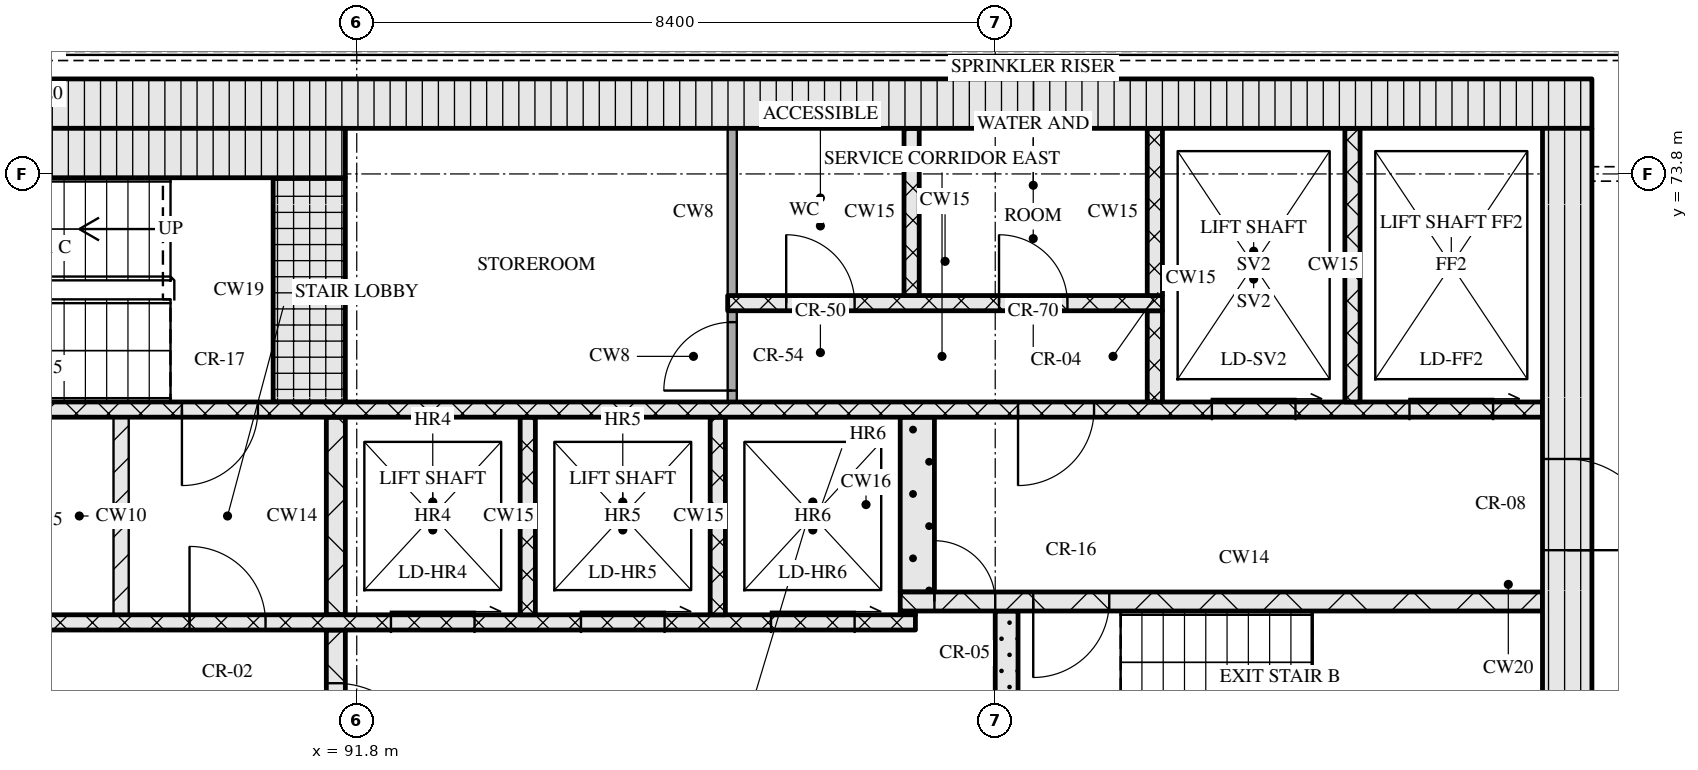
"""IFC4 building model, lengths in metres.
Left out: names, types, materials, properties, quantities, classifications, styles, units other than length and angle.
Written with IfcOpenShell. Run it as: python <this file> out.ifc"""

import sys

from ifc_helpers import new_model, si_unit, direction, frame, frame_2d, origin, place, context, subcontext, project, spatial, rectangle, extrude, element, fill, save


model = new_model("IFC4")
c1 = context("Model", 3, precision=1e-05, world=origin(), true_north=direction((0.0, 1.0)))
c2 = subcontext(c1, "Body", "Model", "MODEL_VIEW")
j1 = project(units=[si_unit("LENGTHUNIT", "METRE"), si_unit("PLANEANGLEUNIT", "RADIAN")], contexts=[c1])
p1 = place(None, origin())
s1 = spatial("IfcSite", under=j1, at=p1, CompositionType="ELEMENT")
p2 = place(p1, origin())
s2 = spatial("IfcBuilding", under=s1, at=p2, CompositionType="ELEMENT")
p3 = place(p2, frame((0.0, 0.0, 248.7)))
s3 = spatial("IfcBuildingStorey", under=s2, at=p3, CompositionType="ELEMENT", Elevation=248.7)
p4 = place(p3, frame((67.15, 74.725, 0.0), z_axis=(0.0, 0.0, 1.0), x_axis=(1.0, 0.0, 0.0)))
e1 = element("IfcWall", 1, at=p4, inside=s3, PredefinedType="SOLIDWALL", context=c2, shape_type="SweptSolid", body=[
    extrude(rectangle(XDim=40.9, YDim=0.65, at=frame_2d((20.45, 0.0))), origin(), (0.0, 0.0, 1.0), 3.3),
])
p5 = place(p3, frame((107.725, 62.4, 0.0), z_axis=(0.0, 0.0, 1.0), x_axis=(0.0, 1.0, 0.0)))
e2 = element("IfcWall", 2, at=p5, inside=s3, PredefinedType="SOLIDWALL", context=c2, shape_type="SweptSolid", body=[
    extrude(rectangle(XDim=12.0, YDim=0.65, at=frame_2d((6.0, 0.0))), origin(), (0.0, 0.0, 1.0), 3.3),
])
p6 = place(p5, frame((6.45, 0.0, 0.0)))
e3 = element("IfcOpeningElement", 3, at=p6, cuts=e2, PredefinedType="OPENING", context=c2, shape_type="SweptSolid", body=[
    extrude(rectangle(XDim=1.2, YDim=2.1, at=frame_2d((0.6, 1.05))), frame((0.0, 0.335, 0.0), z_axis=(0.0, -1.0, 0.0), x_axis=(1.0, 0.0, 0.0)), (0.0, 0.0, 1.0), 0.67),
])
p7 = place(p3, frame((91.525, 65.2, 0.0), z_axis=(0.0, 0.0, 1.0), x_axis=(0.0, 1.0, 0.0)))
e4 = element("IfcWall", 4, at=p7, inside=s3, PredefinedType="SOLIDWALL", context=c2, shape_type="SweptSolid", body=[
    extrude(rectangle(XDim=2.6, YDim=0.25, at=frame_2d((1.3, 0.0))), origin(), (0.0, 0.0, 1.0), 3.3),
])
p8 = place(p7, frame((0.7, 0.0, 0.0)))
e5 = element("IfcOpeningElement", 5, at=p8, cuts=e4, PredefinedType="OPENING", context=c2, shape_type="SweptSolid", body=[
    extrude(rectangle(XDim=1.2, YDim=2.1, at=frame_2d((0.6, 1.05))), frame((0.0, 0.135, 0.0), z_axis=(0.0, -1.0, 0.0), x_axis=(1.0, 0.0, 0.0)), (0.0, 0.0, 1.0), 0.27),
])
p9 = place(p3, frame((100.35, 65.2, 0.0), z_axis=(0.0, 0.0, 1.0), x_axis=(0.0, 1.0, 0.0)))
e6 = element("IfcWall", 6, at=p9, inside=s3, PredefinedType="SOLIDWALL", context=c2, shape_type="SweptSolid", body=[
    extrude(rectangle(XDim=2.85, YDim=0.3, at=frame_2d((1.425, 0.0))), origin(), (0.0, 0.0, 1.0), 3.3),
])
p10 = place(p3, frame((76.05, 67.9, 0.0), z_axis=(0.0, 0.0, 1.0), x_axis=(1.0, 0.0, 0.0)))
e7 = element("IfcWall", 7, at=p10, inside=s3, PredefinedType="SOLIDWALL", context=c2, shape_type="SweptSolid", body=[
    extrude(rectangle(XDim=23.1, YDim=0.2, at=frame_2d((11.55, 0.0))), origin(), (0.0, 0.0, 1.0), 3.3),
])
p11 = place(p10, frame((1.95, 0.0, 0.0)))
e8 = element("IfcOpeningElement", 8, at=p11, cuts=e7, PredefinedType="OPENING", context=c2, shape_type="SweptSolid", body=[
    extrude(rectangle(XDim=0.9, YDim=2.1, at=frame_2d((0.45, 1.05))), frame((0.0, 0.11, 0.0), z_axis=(0.0, -1.0, 0.0), x_axis=(1.0, 0.0, 0.0)), (0.0, 0.0, 1.0), 0.22),
])
p12 = place(p10, frame((5.66, 0.0, 0.0)))
e9 = element("IfcOpeningElement", 9, at=p12, cuts=e7, PredefinedType="OPENING", context=c2, shape_type="SweptSolid", body=[
    extrude(rectangle(XDim=0.9, YDim=2.1, at=frame_2d((0.45, 1.05))), frame((0.0, 0.11, 0.0), z_axis=(0.0, -1.0, 0.0), x_axis=(1.0, 0.0, 0.0)), (0.0, 0.0, 1.0), 0.22),
])
p13 = place(p10, frame((9.7, 0.0, 0.0)))
e10 = element("IfcOpeningElement", 10, at=p13, cuts=e7, PredefinedType="OPENING", context=c2, shape_type="SweptSolid", body=[
    extrude(rectangle(XDim=0.9, YDim=2.1, at=frame_2d((0.45, 1.05))), frame((0.0, 0.11, 0.0), z_axis=(0.0, -1.0, 0.0), x_axis=(1.0, 0.0, 0.0)), (0.0, 0.0, 1.0), 0.22),
])
p14 = place(p10, frame((13.55, 0.0, 0.0)))
e11 = element("IfcOpeningElement", 11, at=p14, cuts=e7, PredefinedType="OPENING", context=c2, shape_type="SweptSolid", body=[
    extrude(rectangle(XDim=1.0, YDim=2.1, at=frame_2d((0.5, 1.05))), frame((0.0, 0.11, 0.0), z_axis=(0.0, -1.0, 0.0), x_axis=(1.0, 0.0, 0.0)), (0.0, 0.0, 1.0), 0.22),
])
p15 = place(p10, frame((16.2, 0.0, 0.0)))
e12 = element("IfcOpeningElement", 12, at=p15, cuts=e7, PredefinedType="OPENING", context=c2, shape_type="SweptSolid", body=[
    extrude(rectangle(XDim=1.1, YDim=2.1, at=frame_2d((0.55, 1.05))), frame((0.0, 0.11, 0.0), z_axis=(0.0, -1.0, 0.0), x_axis=(1.0, 0.0, 0.0)), (0.0, 0.0, 1.0), 0.22),
])
p16 = place(p10, frame((18.7, 0.0, 0.0)))
e13 = element("IfcOpeningElement", 13, at=p16, cuts=e7, PredefinedType="OPENING", context=c2, shape_type="SweptSolid", body=[
    extrude(rectangle(XDim=1.1, YDim=2.1, at=frame_2d((0.55, 1.05))), frame((0.0, 0.11, 0.0), z_axis=(0.0, -1.0, 0.0), x_axis=(1.0, 0.0, 0.0)), (0.0, 0.0, 1.0), 0.22),
])
p17 = place(p10, frame((21.2, 0.0, 0.0)))
e14 = element("IfcOpeningElement", 14, at=p17, cuts=e7, PredefinedType="OPENING", context=c2, shape_type="SweptSolid", body=[
    extrude(rectangle(XDim=1.1, YDim=2.1, at=frame_2d((0.55, 1.05))), frame((0.0, 0.11, 0.0), z_axis=(0.0, -1.0, 0.0), x_axis=(1.0, 0.0, 0.0)), (0.0, 0.0, 1.0), 0.22),
])
p18 = place(p3, frame((88.7, 68.0, 0.0), z_axis=(0.0, 0.0, 1.0), x_axis=(0.0, 1.0, 0.0)))
e15 = element("IfcWall", 15, at=p18, inside=s3, PredefinedType="PARTITIONING", context=c2, shape_type="SweptSolid", body=[
    extrude(rectangle(XDim=2.6, YDim=0.2, at=frame_2d((1.3, 0.0))), origin(), (0.0, 0.0, 1.0), 3.3),
])
p19 = place(p3, frame((91.525, 68.0, 0.0), z_axis=(0.0, 0.0, 1.0), x_axis=(0.0, 1.0, 0.0)))
e16 = element("IfcWall", 16, at=p19, inside=s3, PredefinedType="SOLIDWALL", context=c2, shape_type="SweptSolid", body=[
    extrude(rectangle(XDim=2.6, YDim=0.25, at=frame_2d((1.3, 0.0))), origin(), (0.0, 0.0, 1.0), 3.3),
])
for number, where, z_axis, x_axis in (
    (17, (94.05, 68.0, 0.0), (0.0, 0.0, 1.0), (0.0, 1.0, 0.0)),
    (18, (96.55, 68.0, 0.0), (0.0, 0.0, 1.0), (0.0, 1.0, 0.0)),
):
    element("IfcWall", number, at=place(p3, frame(where, z_axis=z_axis, x_axis=x_axis)), inside=s3, PredefinedType="SOLIDWALL", context=c2, shape_type="SweptSolid", body=[
        extrude(rectangle(XDim=2.6, YDim=0.2, at=frame_2d((1.3, 0.0))), origin(), (0.0, 0.0, 1.0), 3.3),
    ])
p20 = place(p3, frame((98.95, 68.025, 0.0), z_axis=(0.0, 0.0, 1.0), x_axis=(1.0, 0.0, 0.0)))
e19 = element("IfcWall", 19, at=p20, inside=s3, PredefinedType="SOLIDWALL", context=c2, shape_type="SweptSolid", body=[
    extrude(rectangle(XDim=0.2, YDim=0.05, at=frame_2d((0.1, 0.0))), origin(), (0.0, 0.0, 1.0), 3.3),
])
p21 = place(p3, frame((98.95, 68.175, 0.0), z_axis=(0.0, 0.0, 1.0), x_axis=(1.0, 0.0, 0.0)))
e20 = element("IfcWall", 20, at=p21, inside=s3, PredefinedType="SOLIDWALL", context=c2, shape_type="SweptSolid", body=[
    extrude(rectangle(XDim=8.45, YDim=0.25, at=frame_2d((4.225, 0.0))), origin(), (0.0, 0.0, 1.0), 3.3),
])
p22 = place(p21, frame((0.45, 0.0, 0.0)))
e21 = element("IfcOpeningElement", 21, at=p22, cuts=e20, PredefinedType="OPENING", context=c2, shape_type="SweptSolid", body=[
    extrude(rectangle(XDim=0.8, YDim=2.1, at=frame_2d((0.4, 1.05))), frame((0.0, 0.135, 0.0), z_axis=(0.0, -1.0, 0.0), x_axis=(1.0, 0.0, 0.0)), (0.0, 0.0, 1.0), 0.27),
])
p23 = place(p21, frame((1.75, 0.0, 0.0)))
e22 = element("IfcOpeningElement", 22, at=p23, cuts=e20, PredefinedType="OPENING", context=c2, shape_type="SweptSolid", body=[
    extrude(rectangle(XDim=1.0, YDim=2.1, at=frame_2d((0.5, 1.05))), frame((0.0, 0.135, 0.0), z_axis=(0.0, -1.0, 0.0), x_axis=(1.0, 0.0, 0.0)), (0.0, 0.0, 1.0), 0.27),
])
p24 = place(p3, frame((99.175, 68.3, 0.0), z_axis=(0.0, 0.0, 1.0), x_axis=(0.0, 1.0, 0.0)))
e23 = element("IfcWall", 23, at=p24, inside=s3, PredefinedType="SOLIDWALL", context=c2, shape_type="SweptSolid", body=[
    extrude(rectangle(XDim=2.3, YDim=0.45, at=frame_2d((1.15, 0.0))), origin(), (0.0, 0.0, 1.0), 3.3),
])
p25 = place(p3, frame((67.8, 70.7, 0.0), z_axis=(0.0, 0.0, 1.0), x_axis=(1.0, 0.0, 0.0)))
e24 = element("IfcWall", 24, at=p25, inside=s3, PredefinedType="SOLIDWALL", context=c2, shape_type="SweptSolid", body=[
    extrude(rectangle(XDim=39.6, YDim=0.2, at=frame_2d((19.8, 0.0))), origin(), (0.0, 0.0, 1.0), 3.3),
])
p26 = place(p25, frame((0.65, 0.0, 0.0)))
e25 = element("IfcOpeningElement", 25, at=p26, cuts=e24, PredefinedType="OPENING", context=c2, shape_type="SweptSolid", body=[
    extrude(rectangle(XDim=1.1, YDim=2.1, at=frame_2d((0.55, 1.05))), frame((0.0, 0.11, 0.0), z_axis=(0.0, -1.0, 0.0), x_axis=(1.0, 0.0, 0.0)), (0.0, 0.0, 1.0), 0.22),
])
p27 = place(p25, frame((3.25, 0.0, 0.0)))
e26 = element("IfcOpeningElement", 26, at=p27, cuts=e24, PredefinedType="OPENING", context=c2, shape_type="SweptSolid", body=[
    extrude(rectangle(XDim=1.1, YDim=2.1, at=frame_2d((0.55, 1.05))), frame((0.0, 0.11, 0.0), z_axis=(0.0, -1.0, 0.0), x_axis=(1.0, 0.0, 0.0)), (0.0, 0.0, 1.0), 0.22),
])
p28 = place(p25, frame((5.9, 0.0, 0.0)))
e27 = element("IfcOpeningElement", 27, at=p28, cuts=e24, PredefinedType="OPENING", context=c2, shape_type="SweptSolid", body=[
    extrude(rectangle(XDim=1.0, YDim=2.1, at=frame_2d((0.5, 1.05))), frame((0.0, 0.11, 0.0), z_axis=(0.0, -1.0, 0.0), x_axis=(1.0, 0.0, 0.0)), (0.0, 0.0, 1.0), 0.22),
])
p29 = place(p25, frame((21.7, 0.0, 0.0)))
e28 = element("IfcOpeningElement", 28, at=p29, cuts=e24, PredefinedType="OPENING", context=c2, shape_type="SweptSolid", body=[
    extrude(rectangle(XDim=1.0, YDim=2.1, at=frame_2d((0.5, 1.05))), frame((0.0, 0.11, 0.0), z_axis=(0.0, -1.0, 0.0), x_axis=(1.0, 0.0, 0.0)), (0.0, 0.0, 1.0), 0.22),
])
p30 = place(p25, frame((32.7, 0.0, 0.0)))
e29 = element("IfcOpeningElement", 29, at=p30, cuts=e24, PredefinedType="OPENING", context=c2, shape_type="SweptSolid", body=[
    extrude(rectangle(XDim=1.0, YDim=2.1, at=frame_2d((0.5, 1.05))), frame((0.0, 0.11, 0.0), z_axis=(0.0, -1.0, 0.0), x_axis=(1.0, 0.0, 0.0)), (0.0, 0.0, 1.0), 0.22),
])
p31 = place(p25, frame((35.25, 0.0, 0.0)))
e30 = element("IfcOpeningElement", 30, at=p31, cuts=e24, PredefinedType="OPENING", context=c2, shape_type="SweptSolid", body=[
    extrude(rectangle(XDim=1.1, YDim=2.1, at=frame_2d((0.55, 1.05))), frame((0.0, 0.11, 0.0), z_axis=(0.0, -1.0, 0.0), x_axis=(1.0, 0.0, 0.0)), (0.0, 0.0, 1.0), 0.22),
])
p32 = place(p25, frame((37.85, 0.0, 0.0)))
e31 = element("IfcOpeningElement", 31, at=p32, cuts=e24, PredefinedType="OPENING", context=c2, shape_type="SweptSolid", body=[
    extrude(rectangle(XDim=1.1, YDim=2.1, at=frame_2d((0.55, 1.05))), frame((0.0, 0.11, 0.0), z_axis=(0.0, -1.0, 0.0), x_axis=(1.0, 0.0, 0.0)), (0.0, 0.0, 1.0), 0.22),
])
p33 = place(p3, frame((91.175, 70.8, 0.0), z_axis=(0.0, 0.0, 1.0), x_axis=(0.0, 1.0, 0.0)))
e32 = element("IfcWall", 32, at=p33, inside=s3, PredefinedType="SOLIDWALL", context=c2, shape_type="SweptSolid", body=[
    extrude(rectangle(XDim=2.95, YDim=0.95, at=frame_2d((1.475, 0.0))), origin(), (0.0, 0.0, 1.0), 3.3),
])
p34 = place(p3, frame((96.74, 70.8, 0.0), z_axis=(0.0, 0.0, 1.0), x_axis=(0.0, 1.0, 0.0)))
e33 = element("IfcWall", 33, at=p34, inside=s3, PredefinedType="PARTITIONING", context=c2, shape_type="SweptSolid", body=[
    extrude(rectangle(XDim=1.2, YDim=0.12, at=frame_2d((0.6, 0.0))), origin(), (0.0, 0.0, 1.0), 3.3),
])
p35 = place(p34, frame((0.15, 0.0, 0.0)))
e34 = element("IfcOpeningElement", 34, at=p35, cuts=e33, PredefinedType="OPENING", context=c2, shape_type="SweptSolid", body=[
    extrude(rectangle(XDim=0.9, YDim=2.1, at=frame_2d((0.45, 1.05))), frame((0.0, 0.07, 0.0), z_axis=(0.0, -1.0, 0.0), x_axis=(1.0, 0.0, 0.0)), (0.0, 0.0, 1.0), 0.14),
])
p36 = place(p3, frame((102.3, 70.8, 0.0), z_axis=(0.0, 0.0, 1.0), x_axis=(0.0, 1.0, 0.0)))
e35 = element("IfcWall", 35, at=p36, inside=s3, PredefinedType="SOLIDWALL", context=c2, shape_type="SweptSolid", body=[
    extrude(rectangle(XDim=1.2, YDim=0.2, at=frame_2d((0.6, 0.0))), origin(), (0.0, 0.0, 1.0), 3.3),
])
p37 = place(p3, frame((104.9, 70.8, 0.0), z_axis=(0.0, 0.0, 1.0), x_axis=(0.0, 1.0, 0.0)))
e36 = element("IfcWall", 36, at=p37, inside=s3, PredefinedType="SOLIDWALL", context=c2, shape_type="SweptSolid", body=[
    extrude(rectangle(XDim=3.6, YDim=0.2, at=frame_2d((1.8, 0.0))), origin(), (0.0, 0.0, 1.0), 3.3),
])
p38 = place(p3, frame((96.68, 72.1, 0.0), z_axis=(0.0, 0.0, 1.0), x_axis=(1.0, 0.0, 0.0)))
e37 = element("IfcWall", 37, at=p38, inside=s3, PredefinedType="SOLIDWALL", context=c2, shape_type="SweptSolid", body=[
    extrude(rectangle(XDim=5.72, YDim=0.2, at=frame_2d((2.86, 0.0))), origin(), (0.0, 0.0, 1.0), 3.3),
])
p39 = place(p38, frame((0.77, 0.0, 0.0)))
e38 = element("IfcOpeningElement", 38, at=p39, cuts=e37, PredefinedType="OPENING", context=c2, shape_type="SweptSolid", body=[
    extrude(rectangle(XDim=0.9, YDim=2.1, at=frame_2d((0.45, 1.05))), frame((0.0, 0.11, 0.0), z_axis=(0.0, -1.0, 0.0), x_axis=(1.0, 0.0, 0.0)), (0.0, 0.0, 1.0), 0.22),
])
p40 = place(p38, frame((3.57, 0.0, 0.0)))
e39 = element("IfcOpeningElement", 39, at=p40, cuts=e37, PredefinedType="OPENING", context=c2, shape_type="SweptSolid", body=[
    extrude(rectangle(XDim=0.9, YDim=2.1, at=frame_2d((0.45, 1.05))), frame((0.0, 0.11, 0.0), z_axis=(0.0, -1.0, 0.0), x_axis=(1.0, 0.0, 0.0)), (0.0, 0.0, 1.0), 0.22),
])
p41 = place(p3, frame((96.74, 72.2, 0.0), z_axis=(0.0, 0.0, 1.0), x_axis=(0.0, 1.0, 0.0)))
e40 = element("IfcWall", 40, at=p41, inside=s3, PredefinedType="PARTITIONING", context=c2, shape_type="SweptSolid", body=[
    extrude(rectangle(XDim=2.2, YDim=0.12, at=frame_2d((1.1, 0.0))), origin(), (0.0, 0.0, 1.0), 3.3),
])
for number, where, z_axis, x_axis in (
    (41, (99.1, 72.2, 0.0), (0.0, 0.0, 1.0), (0.0, 1.0, 0.0)),
    (42, (102.3, 72.2, 0.0), (0.0, 0.0, 1.0), (0.0, 1.0, 0.0)),
):
    element("IfcWall", number, at=place(p3, frame(where, z_axis=z_axis, x_axis=x_axis)), inside=s3, PredefinedType="SOLIDWALL", context=c2, shape_type="SweptSolid", body=[
        extrude(rectangle(XDim=2.2, YDim=0.2, at=frame_2d((1.1, 0.0))), origin(), (0.0, 0.0, 1.0), 3.3),
    ])
p42 = place(p3, frame((83.55, 74.075, 0.0), z_axis=(0.0, 0.0, 1.0), x_axis=(1.0, 0.0, 0.0)))
e43 = element("IfcWall", 43, at=p42, inside=s3, PredefinedType="SOLIDWALL", context=c2, shape_type="SweptSolid", body=[
    extrude(rectangle(XDim=8.1, YDim=0.65, at=frame_2d((4.05, 0.0))), origin(), (0.0, 0.0, 1.0), 3.3),
])
p43 = place(p8, origin())
e44 = element("IfcDoor", 44, at=p43, inside=s3, OperationType="SINGLE_SWING_RIGHT", PredefinedType="DOOR", context=c2, shape_type="SweptSolid", body=[
    extrude(rectangle(XDim=1.2, YDim=2.1, at=frame_2d((0.6, 1.05))), frame((0.0, 0.025, 0.0), z_axis=(0.0, -1.0, 0.0), x_axis=(1.0, 0.0, 0.0)), (0.0, 0.0, 1.0), 0.05),
])
fill(e5, e44)
p44 = place(p14, origin())
e45 = element("IfcDoor", 45, at=p44, inside=s3, OperationType="SINGLE_SWING_LEFT", PredefinedType="DOOR", context=c2, shape_type="SweptSolid", body=[
    extrude(rectangle(XDim=1.0, YDim=2.1, at=frame_2d((0.5, 1.05))), frame((0.0, 0.025, 0.0), z_axis=(0.0, -1.0, 0.0), x_axis=(1.0, 0.0, 0.0)), (0.0, 0.0, 1.0), 0.05),
])
fill(e11, e45)
p45 = place(p15, origin())
e46 = element("IfcDoor", 46, at=p45, inside=s3, OperationType="SLIDING_TO_RIGHT", PredefinedType="DOOR", context=c2, shape_type="SweptSolid", body=[
    extrude(rectangle(XDim=1.1, YDim=2.1, at=frame_2d((0.55, 1.05))), frame((0.0, 0.025, 0.0), z_axis=(0.0, -1.0, 0.0), x_axis=(1.0, 0.0, 0.0)), (0.0, 0.0, 1.0), 0.05),
])
fill(e12, e46)
p46 = place(p16, origin())
e47 = element("IfcDoor", 47, at=p46, inside=s3, OperationType="SLIDING_TO_RIGHT", PredefinedType="DOOR", context=c2, shape_type="SweptSolid", body=[
    extrude(rectangle(XDim=1.1, YDim=2.1, at=frame_2d((0.55, 1.05))), frame((0.0, 0.025, 0.0), z_axis=(0.0, -1.0, 0.0), x_axis=(1.0, 0.0, 0.0)), (0.0, 0.0, 1.0), 0.05),
])
fill(e13, e47)
p47 = place(p17, origin())
e48 = element("IfcDoor", 48, at=p47, inside=s3, OperationType="SLIDING_TO_RIGHT", PredefinedType="DOOR", context=c2, shape_type="SweptSolid", body=[
    extrude(rectangle(XDim=1.1, YDim=2.1, at=frame_2d((0.55, 1.05))), frame((0.0, 0.025, 0.0), z_axis=(0.0, -1.0, 0.0), x_axis=(1.0, 0.0, 0.0)), (0.0, 0.0, 1.0), 0.05),
])
fill(e14, e48)
p48 = place(p22, origin())
e49 = element("IfcDoor", 49, at=p48, inside=s3, OperationType="SINGLE_SWING_LEFT", PredefinedType="DOOR", context=c2, shape_type="SweptSolid", body=[
    extrude(rectangle(XDim=0.8, YDim=2.1, at=frame_2d((0.4, 1.05))), frame((0.0, 0.025, 0.0), z_axis=(0.0, -1.0, 0.0), x_axis=(1.0, 0.0, 0.0)), (0.0, 0.0, 1.0), 0.05),
])
fill(e21, e49)
p49 = place(p23, origin())
e50 = element("IfcDoor", 50, at=p49, inside=s3, OperationType="SINGLE_SWING_RIGHT", PredefinedType="DOOR", context=c2, shape_type="SweptSolid", body=[
    extrude(rectangle(XDim=1.0, YDim=2.1, at=frame_2d((0.5, 1.05))), frame((0.0, 0.025, 0.0), z_axis=(0.0, -1.0, 0.0), x_axis=(1.0, 0.0, 0.0)), (0.0, 0.0, 1.0), 0.05),
])
fill(e22, e50)
p50 = place(p6, origin())
e51 = element("IfcDoor", 51, at=p50, inside=s3, OperationType="SINGLE_SWING_RIGHT", PredefinedType="DOOR", context=c2, shape_type="SweptSolid", body=[
    extrude(rectangle(XDim=1.2, YDim=2.1, at=frame_2d((0.6, 1.05))), frame((0.0, 0.025, 0.0), z_axis=(0.0, -1.0, 0.0), x_axis=(1.0, 0.0, 0.0)), (0.0, 0.0, 1.0), 0.05),
])
fill(e3, e51)
p51 = place(p29, origin())
e52 = element("IfcDoor", 52, at=p51, inside=s3, OperationType="SINGLE_SWING_RIGHT", PredefinedType="DOOR", context=c2, shape_type="SweptSolid", body=[
    extrude(rectangle(XDim=1.0, YDim=2.1, at=frame_2d((0.5, 1.05))), frame((0.0, 0.025, 0.0), z_axis=(0.0, -1.0, 0.0), x_axis=(1.0, 0.0, 0.0)), (0.0, 0.0, 1.0), 0.05),
])
fill(e28, e52)
p52 = place(p30, origin())
e53 = element("IfcDoor", 53, at=p52, inside=s3, OperationType="SINGLE_SWING_RIGHT", PredefinedType="DOOR", context=c2, shape_type="SweptSolid", body=[
    extrude(rectangle(XDim=1.0, YDim=2.1, at=frame_2d((0.5, 1.05))), frame((0.0, 0.025, 0.0), z_axis=(0.0, -1.0, 0.0), x_axis=(1.0, 0.0, 0.0)), (0.0, 0.0, 1.0), 0.05),
])
fill(e29, e53)
p53 = place(p31, origin())
e54 = element("IfcDoor", 54, at=p53, inside=s3, OperationType="SLIDING_TO_RIGHT", PredefinedType="DOOR", context=c2, shape_type="SweptSolid", body=[
    extrude(rectangle(XDim=1.1, YDim=2.1, at=frame_2d((0.55, 1.05))), frame((0.0, 0.025, 0.0), z_axis=(0.0, -1.0, 0.0), x_axis=(1.0, 0.0, 0.0)), (0.0, 0.0, 1.0), 0.05),
])
fill(e30, e54)
p54 = place(p32, origin())
e55 = element("IfcDoor", 55, at=p54, inside=s3, OperationType="SLIDING_TO_RIGHT", PredefinedType="DOOR", context=c2, shape_type="SweptSolid", body=[
    extrude(rectangle(XDim=1.1, YDim=2.1, at=frame_2d((0.55, 1.05))), frame((0.0, 0.025, 0.0), z_axis=(0.0, -1.0, 0.0), x_axis=(1.0, 0.0, 0.0)), (0.0, 0.0, 1.0), 0.05),
])
fill(e31, e55)
p55 = place(p35, origin())
e56 = element("IfcDoor", 56, at=p55, inside=s3, OperationType="SINGLE_SWING_LEFT", PredefinedType="DOOR", context=c2, shape_type="SweptSolid", body=[
    extrude(rectangle(XDim=0.9, YDim=2.1, at=frame_2d((0.45, 1.05))), frame((0.0, 0.025, 0.0), z_axis=(0.0, -1.0, 0.0), x_axis=(1.0, 0.0, 0.0)), (0.0, 0.0, 1.0), 0.05),
])
fill(e34, e56)
p56 = place(p39, origin())
e57 = element("IfcDoor", 57, at=p56, inside=s3, OperationType="SINGLE_SWING_LEFT", PredefinedType="DOOR", context=c2, shape_type="SweptSolid", body=[
    extrude(rectangle(XDim=0.9, YDim=2.1, at=frame_2d((0.45, 1.05))), frame((0.0, 0.025, 0.0), z_axis=(0.0, -1.0, 0.0), x_axis=(1.0, 0.0, 0.0)), (0.0, 0.0, 1.0), 0.05),
])
fill(e38, e57)
p57 = place(p40, origin())
e58 = element("IfcDoor", 58, at=p57, inside=s3, OperationType="SINGLE_SWING_LEFT", PredefinedType="DOOR", context=c2, shape_type="SweptSolid", body=[
    extrude(rectangle(XDim=0.9, YDim=2.1, at=frame_2d((0.45, 1.05))), frame((0.0, 0.025, 0.0), z_axis=(0.0, -1.0, 0.0), x_axis=(1.0, 0.0, 0.0)), (0.0, 0.0, 1.0), 0.05),
])
fill(e39, e58)
save(model, sys.argv[1])
